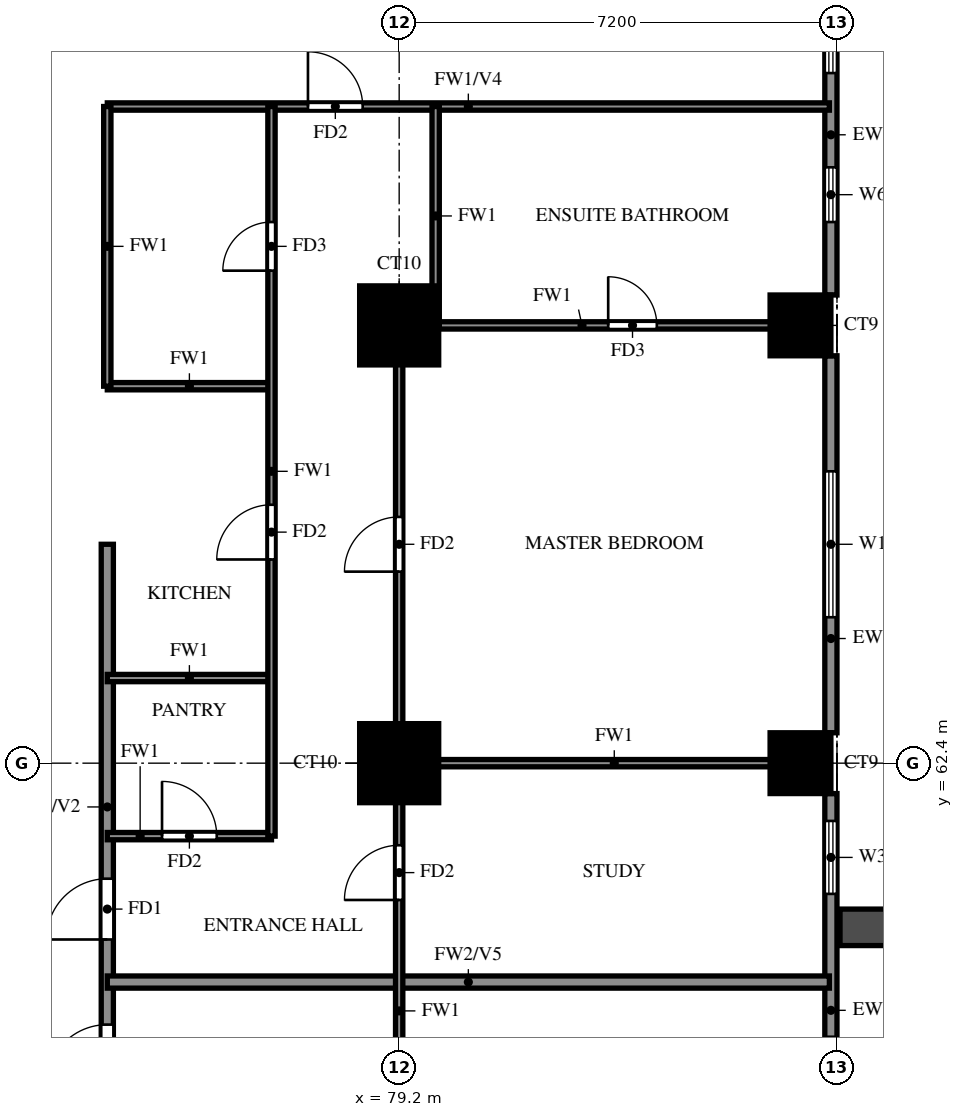
"""IFC4 building model, lengths in metres.
Left out: names, types, materials, properties, quantities, classifications, styles, units other than length and angle.
Written with IfcOpenShell. Run it as: python <this file> out.ifc"""

import sys

from ifc_helpers import new_model, si_unit, direction, frame, frame_2d, origin, origin_2d, place, context, subcontext, project, spatial, rectangle, extrude, source, transform, mapped, element, fill, save


model = new_model("IFC4")
c1 = context("Model", 3, precision=1e-05, world=origin(), true_north=direction((0.0, 1.0)))
c2 = subcontext(c1, "Body", "Model", "MODEL_VIEW")
j1 = project(units=[si_unit("LENGTHUNIT", "METRE"), si_unit("PLANEANGLEUNIT", "RADIAN")], contexts=[c1])
p1 = place(None, origin())
s1 = spatial("IfcSite", under=j1, at=p1, CompositionType="ELEMENT")
p2 = place(p1, origin())
s2 = spatial("IfcBuilding", under=s1, at=p2, CompositionType="ELEMENT")
p3 = place(p2, frame((0.0, 0.0, 90.0)))
s3 = spatial("IfcBuildingStorey", under=s2, at=p3, CompositionType="ELEMENT", Elevation=90.0)
m1 = source(origin(), c2, "Body", "SweptSolid", [
    extrude(rectangle(XDim=1.3, YDim=1.3, at=origin_2d()), origin(), (0.0, 0.0, 1.0), 3.18),
])
p4 = place(p3, frame((79.2, 62.4, 0.0), z_axis=(0.0, 0.0, 1.0), x_axis=(1.0, 0.0, 0.0)))
e1 = element("IfcColumn", 1, at=p4, inside=s3, PredefinedType="COLUMN", context=c2, shape_type="MappedRepresentation", body=[
    mapped(m1, transform((0.0, 0.0, 0.0))),
])
m2 = source(origin(), c2, "Body", "SweptSolid", [
    extrude(rectangle(XDim=1.0, YDim=1.0, at=origin_2d()), origin(), (0.0, 0.0, 1.0), 3.18),
])
p5 = place(p3, frame((85.8, 62.4, 0.0), z_axis=(0.0, 0.0, 1.0), x_axis=(1.0, 0.0, 0.0)))
e2 = element("IfcColumn", 2, at=p5, inside=s3, PredefinedType="COLUMN", context=c2, shape_type="MappedRepresentation", body=[
    mapped(m2, transform((0.0, 0.0, 0.0))),
])
p6 = place(p3, frame((79.2, 69.6, 0.0), z_axis=(0.0, 0.0, 1.0), x_axis=(1.0, 0.0, 0.0)))
e3 = element("IfcColumn", 3, at=p6, inside=s3, PredefinedType="COLUMN", context=c2, shape_type="MappedRepresentation", body=[
    mapped(m1, transform((0.0, 0.0, 0.0))),
])
p7 = place(p3, frame((85.8, 69.6, 0.0), z_axis=(0.0, 0.0, 1.0), x_axis=(1.0, 0.0, 0.0)))
e4 = element("IfcColumn", 4, at=p7, inside=s3, PredefinedType="COLUMN", context=c2, shape_type="MappedRepresentation", body=[
    mapped(m2, transform((0.0, 0.0, 0.0))),
])
p8 = place(p3, frame((86.3, 55.7, 0.0), z_axis=(0.0, 0.0, 1.0), x_axis=(0.0, 1.0, 0.0)))
e5 = element("IfcWall", 5, at=p8, inside=s3, PredefinedType="SOLIDWALL", context=c2, shape_type="SweptSolid", body=[
    extrude(rectangle(XDim=6.2, YDim=0.2, at=frame_2d((3.1, 0.0))), origin(), (0.0, 0.0, 1.0), 3.18),
])
p9 = place(p8, frame((0.4, 0.0, 0.0)))
e6 = element("IfcOpeningElement", 6, at=p9, cuts=e5, PredefinedType="OPENING", context=c2, shape_type="SweptSolid", body=[
    extrude(rectangle(XDim=1.8, YDim=2.4, at=frame_2d((0.9, 1.2))), frame((0.0, 0.11, 0.0), z_axis=(0.0, -1.0, 0.0), x_axis=(1.0, 0.0, 0.0)), (0.0, 0.0, 1.0), 0.22),
])
p10 = place(p8, frame((4.55, 0.0, 0.6)))
e7 = element("IfcOpeningElement", 7, at=p10, cuts=e5, PredefinedType="OPENING", context=c2, shape_type="SweptSolid", body=[
    extrude(rectangle(XDim=1.2, YDim=2.4, at=frame_2d((0.6, 1.2))), frame((0.0, 0.11, 0.0), z_axis=(0.0, -1.0, 0.0), x_axis=(1.0, 0.0, 0.0)), (0.0, 0.0, 1.0), 0.22),
])
p11 = place(p3, frame((86.3, 62.9, 0.0), z_axis=(0.0, 0.0, 1.0), x_axis=(0.0, 1.0, 0.0)))
e8 = element("IfcWall", 8, at=p11, inside=s3, PredefinedType="SOLIDWALL", context=c2, shape_type="SweptSolid", body=[
    extrude(rectangle(XDim=6.2, YDim=0.2, at=frame_2d((3.1, 0.0))), origin(), (0.0, 0.0, 1.0), 3.18),
])
p12 = place(p11, frame((1.9, 0.0, 0.6)))
e9 = element("IfcOpeningElement", 9, at=p12, cuts=e8, PredefinedType="OPENING", context=c2, shape_type="SweptSolid", body=[
    extrude(rectangle(XDim=2.4, YDim=2.4, at=frame_2d((1.2, 1.2))), frame((0.0, 0.11, 0.0), z_axis=(0.0, -1.0, 0.0), x_axis=(1.0, 0.0, 0.0)), (0.0, 0.0, 1.0), 0.22),
])
p13 = place(p3, frame((86.3, 70.1, 0.0), z_axis=(0.0, 0.0, 1.0), x_axis=(0.0, 1.0, 0.0)))
e10 = element("IfcWall", 10, at=p13, inside=s3, PredefinedType="SOLIDWALL", context=c2, shape_type="SweptSolid", body=[
    extrude(rectangle(XDim=6.2, YDim=0.2, at=frame_2d((3.1, 0.0))), origin(), (0.0, 0.0, 1.0), 3.18),
])
p14 = place(p13, frame((1.2, 0.0, 1.5)))
e11 = element("IfcOpeningElement", 11, at=p14, cuts=e10, PredefinedType="OPENING", context=c2, shape_type="SweptSolid", body=[
    extrude(rectangle(XDim=0.9, YDim=0.9, at=frame_2d((0.45, 0.45))), frame((0.0, 0.11, 0.0), z_axis=(0.0, -1.0, 0.0), x_axis=(1.0, 0.0, 0.0)), (0.0, 0.0, 1.0), 0.22),
])
p15 = place(p13, frame((3.65, 0.0, 0.6)))
e12 = element("IfcOpeningElement", 12, at=p15, cuts=e10, PredefinedType="OPENING", context=c2, shape_type="SweptSolid", body=[
    extrude(rectangle(XDim=1.8, YDim=2.4, at=frame_2d((0.9, 1.2))), frame((0.0, 0.11, 0.0), z_axis=(0.0, -1.0, 0.0), x_axis=(1.0, 0.0, 0.0)), (0.0, 0.0, 1.0), 0.22),
])
p16 = place(p3, frame((86.45, 59.7, 0.0), z_axis=(0.0, 0.0, 1.0), x_axis=(1.0, 0.0, 0.0)))
e13 = element("IfcWall", 13, at=p16, inside=s3, PredefinedType="SOLIDWALL", context=c2, shape_type="SweptSolid", body=[
    extrude(rectangle(XDim=2.65, YDim=0.6, at=frame_2d((1.325, 0.0))), origin(), (0.0, 0.0, 1.0), 2.85),
])
p17 = place(p3, frame((74.4, 56.4, 0.0), z_axis=(0.0, 0.0, 1.0), x_axis=(0.0, 1.0, 0.0)))
e14 = element("IfcWall", 14, at=p17, inside=s3, PredefinedType="SOLIDWALL", context=c2, shape_type="SweptSolid", body=[
    extrude(rectangle(XDim=9.6, YDim=0.2, at=frame_2d((4.8, 0.0))), origin(), (0.0, 0.0, 1.0), 3.18),
])
p18 = place(p17, frame((0.7, 0.0, 0.0)))
e15 = element("IfcOpeningElement", 15, at=p18, cuts=e14, PredefinedType="OPENING", context=c2, shape_type="SweptSolid", body=[
    extrude(rectangle(XDim=1.0, YDim=2.1, at=frame_2d((0.5, 1.05))), frame((0.0, 0.11, 0.0), z_axis=(0.0, -1.0, 0.0), x_axis=(1.0, 0.0, 0.0)), (0.0, 0.0, 1.0), 0.22),
])
p19 = place(p17, frame((3.1, 0.0, 0.0)))
e16 = element("IfcOpeningElement", 16, at=p19, cuts=e14, PredefinedType="OPENING", context=c2, shape_type="SweptSolid", body=[
    extrude(rectangle(XDim=1.0, YDim=2.1, at=frame_2d((0.5, 1.05))), frame((0.0, 0.11, 0.0), z_axis=(0.0, -1.0, 0.0), x_axis=(1.0, 0.0, 0.0)), (0.0, 0.0, 1.0), 0.22),
])
p20 = place(p3, frame((74.4, 58.8, 0.0), z_axis=(0.0, 0.0, 1.0), x_axis=(1.0, 0.0, 0.0)))
e17 = element("IfcWall", 17, at=p20, inside=s3, PredefinedType="SOLIDWALL", context=c2, shape_type="SweptSolid", body=[
    extrude(rectangle(XDim=11.875, YDim=0.2, at=frame_2d((5.938, 0.0))), origin(), (0.0, 0.0, 1.0), 2.28),
])
p21 = place(p3, frame((74.4, 61.2, 0.0), z_axis=(0.0, 0.0, 1.0), x_axis=(1.0, 0.0, 0.0)))
e18 = element("IfcWall", 18, at=p21, inside=s3, PredefinedType="PARTITIONING", context=c2, shape_type="SweptSolid", body=[
    extrude(rectangle(XDim=2.7, YDim=0.12, at=frame_2d((1.35, 0.0))), origin(), (0.0, 0.0, 1.0), 3.18),
])
p22 = place(p21, frame((0.9, 0.0, 0.0)))
e19 = element("IfcOpeningElement", 19, at=p22, cuts=e18, PredefinedType="OPENING", context=c2, shape_type="SweptSolid", body=[
    extrude(rectangle(XDim=0.9, YDim=2.1, at=frame_2d((0.45, 1.05))), frame((0.0, 0.07, 0.0), z_axis=(0.0, -1.0, 0.0), x_axis=(1.0, 0.0, 0.0)), (0.0, 0.0, 1.0), 0.14),
])
p23 = place(p3, frame((79.2, 62.4, 0.0), z_axis=(0.0, 0.0, 1.0), x_axis=(1.0, 0.0, 0.0)))
e20 = element("IfcWall", 20, at=p23, inside=s3, PredefinedType="PARTITIONING", context=c2, shape_type="SweptSolid", body=[
    extrude(rectangle(XDim=7.075, YDim=0.12, at=frame_2d((3.538, 0.0))), origin(), (0.0, 0.0, 1.0), 3.18),
])
for number, where, z_axis, x_axis in (
    (21, (74.4, 63.8, 0.0), (0.0, 0.0, 1.0), (1.0, 0.0, 0.0)),
    (22, (74.4, 68.6, 0.0), (0.0, 0.0, 1.0), (1.0, 0.0, 0.0)),
):
    element("IfcWall", number, at=place(p3, frame(where, z_axis=z_axis, x_axis=x_axis)), inside=s3, PredefinedType="PARTITIONING", context=c2, shape_type="SweptSolid", body=[
        extrude(rectangle(XDim=2.7, YDim=0.12, at=frame_2d((1.35, 0.0))), origin(), (0.0, 0.0, 1.0), 3.18),
    ])
p24 = place(p3, frame((79.2, 69.6, 0.0), z_axis=(0.0, 0.0, 1.0), x_axis=(1.0, 0.0, 0.0)))
e23 = element("IfcWall", 23, at=p24, inside=s3, PredefinedType="PARTITIONING", context=c2, shape_type="SweptSolid", body=[
    extrude(rectangle(XDim=7.075, YDim=0.12, at=frame_2d((3.538, 0.0))), origin(), (0.0, 0.0, 1.0), 3.18),
])
p25 = place(p24, frame((3.438, 0.0, 0.0)))
e24 = element("IfcOpeningElement", 24, at=p25, cuts=e23, PredefinedType="OPENING", context=c2, shape_type="SweptSolid", body=[
    extrude(rectangle(XDim=0.8, YDim=2.1, at=frame_2d((0.4, 1.05))), frame((0.0, 0.07, 0.0), z_axis=(0.0, -1.0, 0.0), x_axis=(1.0, 0.0, 0.0)), (0.0, 0.0, 1.0), 0.14),
])
p26 = place(p3, frame((74.4, 73.2, 0.0), z_axis=(0.0, 0.0, 1.0), x_axis=(1.0, 0.0, 0.0)))
e25 = element("IfcWall", 25, at=p26, inside=s3, PredefinedType="PARTITIONING", context=c2, shape_type="SweptSolid", body=[
    extrude(rectangle(XDim=11.875, YDim=0.12, at=frame_2d((5.938, 0.0))), origin(), (0.0, 0.0, 1.0), 2.28),
])
p27 = place(p26, frame((3.3, 0.0, 0.0)))
e26 = element("IfcOpeningElement", 26, at=p27, cuts=e25, PredefinedType="OPENING", context=c2, shape_type="SweptSolid", body=[
    extrude(rectangle(XDim=0.9, YDim=2.1, at=frame_2d((0.45, 1.05))), frame((0.0, 0.07, 0.0), z_axis=(0.0, -1.0, 0.0), x_axis=(1.0, 0.0, 0.0)), (0.0, 0.0, 1.0), 0.14),
])
p28 = place(p3, frame((74.4, 68.6, 0.0), z_axis=(0.0, 0.0, 1.0), x_axis=(0.0, 1.0, 0.0)))
e27 = element("IfcWall", 27, at=p28, inside=s3, PredefinedType="PARTITIONING", context=c2, shape_type="SweptSolid", body=[
    extrude(rectangle(XDim=4.6, YDim=0.12, at=frame_2d((2.3, 0.0))), origin(), (0.0, 0.0, 1.0), 3.18),
])
p29 = place(p3, frame((77.1, 61.2, 0.0), z_axis=(0.0, 0.0, 1.0), x_axis=(0.0, 1.0, 0.0)))
e28 = element("IfcWall", 28, at=p29, inside=s3, PredefinedType="PARTITIONING", context=c2, shape_type="SweptSolid", body=[
    extrude(rectangle(XDim=12.0, YDim=0.12, at=frame_2d((6.0, 0.0))), origin(), (0.0, 0.0, 1.0), 3.18),
])
p30 = place(p29, frame((4.55, 0.0, 0.0)))
e29 = element("IfcOpeningElement", 29, at=p30, cuts=e28, PredefinedType="OPENING", context=c2, shape_type="SweptSolid", body=[
    extrude(rectangle(XDim=0.9, YDim=2.1, at=frame_2d((0.45, 1.05))), frame((0.0, 0.07, 0.0), z_axis=(0.0, -1.0, 0.0), x_axis=(1.0, 0.0, 0.0)), (0.0, 0.0, 1.0), 0.14),
])
p31 = place(p29, frame((9.3, 0.0, 0.0)))
e30 = element("IfcOpeningElement", 30, at=p31, cuts=e28, PredefinedType="OPENING", context=c2, shape_type="SweptSolid", body=[
    extrude(rectangle(XDim=0.8, YDim=2.1, at=frame_2d((0.4, 1.05))), frame((0.0, 0.07, 0.0), z_axis=(0.0, -1.0, 0.0), x_axis=(1.0, 0.0, 0.0)), (0.0, 0.0, 1.0), 0.14),
])
p32 = place(p3, frame((79.2, 48.125, 0.0), z_axis=(0.0, 0.0, 1.0), x_axis=(0.0, 1.0, 0.0)))
e31 = element("IfcWall", 31, at=p32, inside=s3, PredefinedType="PARTITIONING", context=c2, shape_type="SweptSolid", body=[
    extrude(rectangle(XDim=21.475, YDim=0.12, at=frame_2d((10.738, 0.0))), origin(), (0.0, 0.0, 1.0), 3.18),
])
p33 = place(p32, frame((2.788, 0.0, 0.0)))
e32 = element("IfcOpeningElement", 32, at=p33, cuts=e31, PredefinedType="OPENING", context=c2, shape_type="SweptSolid", body=[
    extrude(rectangle(XDim=1.5, YDim=2.1, at=frame_2d((0.75, 1.05))), frame((0.0, 0.07, 0.0), z_axis=(0.0, -1.0, 0.0), x_axis=(1.0, 0.0, 0.0)), (0.0, 0.0, 1.0), 0.14),
])
p34 = place(p32, frame((8.425, 0.0, 0.0)))
e33 = element("IfcOpeningElement", 33, at=p34, cuts=e31, PredefinedType="OPENING", context=c2, shape_type="SweptSolid", body=[
    extrude(rectangle(XDim=0.9, YDim=2.1, at=frame_2d((0.45, 1.05))), frame((0.0, 0.07, 0.0), z_axis=(0.0, -1.0, 0.0), x_axis=(1.0, 0.0, 0.0)), (0.0, 0.0, 1.0), 0.14),
])
p35 = place(p32, frame((12.025, 0.0, 0.0)))
e34 = element("IfcOpeningElement", 34, at=p35, cuts=e31, PredefinedType="OPENING", context=c2, shape_type="SweptSolid", body=[
    extrude(rectangle(XDim=0.9, YDim=2.1, at=frame_2d((0.45, 1.05))), frame((0.0, 0.07, 0.0), z_axis=(0.0, -1.0, 0.0), x_axis=(1.0, 0.0, 0.0)), (0.0, 0.0, 1.0), 0.14),
])
p36 = place(p32, frame((17.425, 0.0, 0.0)))
e35 = element("IfcOpeningElement", 35, at=p36, cuts=e31, PredefinedType="OPENING", context=c2, shape_type="SweptSolid", body=[
    extrude(rectangle(XDim=0.9, YDim=2.1, at=frame_2d((0.45, 1.05))), frame((0.0, 0.07, 0.0), z_axis=(0.0, -1.0, 0.0), x_axis=(1.0, 0.0, 0.0)), (0.0, 0.0, 1.0), 0.14),
])
p37 = place(p3, frame((79.8, 69.6, 0.0), z_axis=(0.0, 0.0, 1.0), x_axis=(0.0, 1.0, 0.0)))
e36 = element("IfcWall", 36, at=p37, inside=s3, PredefinedType="PARTITIONING", context=c2, shape_type="SweptSolid", body=[
    extrude(rectangle(XDim=3.6, YDim=0.12, at=frame_2d((1.8, 0.0))), origin(), (0.0, 0.0, 1.0), 3.18),
])
p38 = place(p10, origin())
e37 = element("IfcWindow", 37, at=p38, inside=s3, PartitioningType="SINGLE_PANEL", PredefinedType="WINDOW", context=c2, shape_type="SweptSolid", body=[
    extrude(rectangle(XDim=1.2, YDim=2.4, at=frame_2d((0.6, 1.2))), frame((0.0, 0.03, 0.0), z_axis=(0.0, -1.0, 0.0), x_axis=(1.0, 0.0, 0.0)), (0.0, 0.0, 1.0), 0.06),
])
fill(e7, e37)
p39 = place(p12, origin())
e38 = element("IfcWindow", 38, at=p39, inside=s3, PartitioningType="DOUBLE_PANEL_VERTICAL", PredefinedType="WINDOW", context=c2, shape_type="SweptSolid", body=[
    extrude(rectangle(XDim=2.4, YDim=2.4, at=frame_2d((1.2, 1.2))), frame((0.0, 0.03, 0.0), z_axis=(0.0, -1.0, 0.0), x_axis=(1.0, 0.0, 0.0)), (0.0, 0.0, 1.0), 0.06),
])
fill(e9, e38)
p40 = place(p14, origin())
e39 = element("IfcWindow", 39, at=p40, inside=s3, PartitioningType="SINGLE_PANEL", PredefinedType="WINDOW", context=c2, shape_type="SweptSolid", body=[
    extrude(rectangle(XDim=0.9, YDim=0.9, at=frame_2d((0.45, 0.45))), frame((0.0, 0.03, 0.0), z_axis=(0.0, -1.0, 0.0), x_axis=(1.0, 0.0, 0.0)), (0.0, 0.0, 1.0), 0.06),
])
fill(e11, e39)
p41 = place(p15, origin())
e40 = element("IfcWindow", 40, at=p41, inside=s3, PartitioningType="DOUBLE_PANEL_VERTICAL", PredefinedType="WINDOW", context=c2, shape_type="SweptSolid", body=[
    extrude(rectangle(XDim=1.8, YDim=2.4, at=frame_2d((0.9, 1.2))), frame((0.0, 0.03, 0.0), z_axis=(0.0, -1.0, 0.0), x_axis=(1.0, 0.0, 0.0)), (0.0, 0.0, 1.0), 0.06),
])
fill(e12, e40)
p42 = place(p18, origin())
e41 = element("IfcDoor", 41, at=p42, inside=s3, OperationType="SINGLE_SWING_LEFT", PredefinedType="DOOR", context=c2, shape_type="SweptSolid", body=[
    extrude(rectangle(XDim=1.0, YDim=2.1, at=frame_2d((0.5, 1.05))), frame((0.0, 0.025, 0.0), z_axis=(0.0, -1.0, 0.0), x_axis=(1.0, 0.0, 0.0)), (0.0, 0.0, 1.0), 0.05),
])
fill(e15, e41)
p43 = place(p19, origin())
e42 = element("IfcDoor", 42, at=p43, inside=s3, OperationType="SINGLE_SWING_LEFT", PredefinedType="DOOR", context=c2, shape_type="SweptSolid", body=[
    extrude(rectangle(XDim=1.0, YDim=2.1, at=frame_2d((0.5, 1.05))), frame((0.0, 0.025, 0.0), z_axis=(0.0, -1.0, 0.0), x_axis=(1.0, 0.0, 0.0)), (0.0, 0.0, 1.0), 0.05),
])
fill(e16, e42)
p44 = place(p35, origin())
e43 = element("IfcDoor", 43, at=p44, inside=s3, OperationType="SINGLE_SWING_RIGHT", PredefinedType="DOOR", context=c2, shape_type="SweptSolid", body=[
    extrude(rectangle(XDim=0.9, YDim=2.1, at=frame_2d((0.45, 1.05))), frame((0.0, 0.025, 0.0), z_axis=(0.0, -1.0, 0.0), x_axis=(1.0, 0.0, 0.0)), (0.0, 0.0, 1.0), 0.05),
])
fill(e34, e43)
p45 = place(p36, origin())
e44 = element("IfcDoor", 44, at=p45, inside=s3, OperationType="SINGLE_SWING_LEFT", PredefinedType="DOOR", context=c2, shape_type="SweptSolid", body=[
    extrude(rectangle(XDim=0.9, YDim=2.1, at=frame_2d((0.45, 1.05))), frame((0.0, 0.025, 0.0), z_axis=(0.0, -1.0, 0.0), x_axis=(1.0, 0.0, 0.0)), (0.0, 0.0, 1.0), 0.05),
])
fill(e35, e44)
p46 = place(p25, origin())
e45 = element("IfcDoor", 45, at=p46, inside=s3, OperationType="SINGLE_SWING_LEFT", PredefinedType="DOOR", context=c2, shape_type="SweptSolid", body=[
    extrude(rectangle(XDim=0.8, YDim=2.1, at=frame_2d((0.4, 1.05))), frame((0.0, 0.025, 0.0), z_axis=(0.0, -1.0, 0.0), x_axis=(1.0, 0.0, 0.0)), (0.0, 0.0, 1.0), 0.05),
])
fill(e24, e45)
p47 = place(p27, origin())
e46 = element("IfcDoor", 46, at=p47, inside=s3, OperationType="SINGLE_SWING_RIGHT", PredefinedType="DOOR", context=c2, shape_type="SweptSolid", body=[
    extrude(rectangle(XDim=0.9, YDim=2.1, at=frame_2d((0.45, 1.05))), frame((0.0, 0.025, 0.0), z_axis=(0.0, -1.0, 0.0), x_axis=(1.0, 0.0, 0.0)), (0.0, 0.0, 1.0), 0.05),
])
fill(e26, e46)
p48 = place(p22, origin())
e47 = element("IfcDoor", 47, at=p48, inside=s3, OperationType="SINGLE_SWING_LEFT", PredefinedType="DOOR", context=c2, shape_type="SweptSolid", body=[
    extrude(rectangle(XDim=0.9, YDim=2.1, at=frame_2d((0.45, 1.05))), frame((0.0, 0.025, 0.0), z_axis=(0.0, -1.0, 0.0), x_axis=(1.0, 0.0, 0.0)), (0.0, 0.0, 1.0), 0.05),
])
fill(e19, e47)
p49 = place(p30, origin())
e48 = element("IfcDoor", 48, at=p49, inside=s3, OperationType="SINGLE_SWING_LEFT", PredefinedType="DOOR", context=c2, shape_type="SweptSolid", body=[
    extrude(rectangle(XDim=0.9, YDim=2.1, at=frame_2d((0.45, 1.05))), frame((0.0, 0.025, 0.0), z_axis=(0.0, -1.0, 0.0), x_axis=(1.0, 0.0, 0.0)), (0.0, 0.0, 1.0), 0.05),
])
fill(e29, e48)
p50 = place(p31, origin())
e49 = element("IfcDoor", 49, at=p50, inside=s3, OperationType="SINGLE_SWING_RIGHT", PredefinedType="DOOR", context=c2, shape_type="SweptSolid", body=[
    extrude(rectangle(XDim=0.8, YDim=2.1, at=frame_2d((0.4, 1.05))), frame((0.0, 0.025, 0.0), z_axis=(0.0, -1.0, 0.0), x_axis=(1.0, 0.0, 0.0)), (0.0, 0.0, 1.0), 0.05),
])
fill(e30, e49)
save(model, sys.argv[1])
